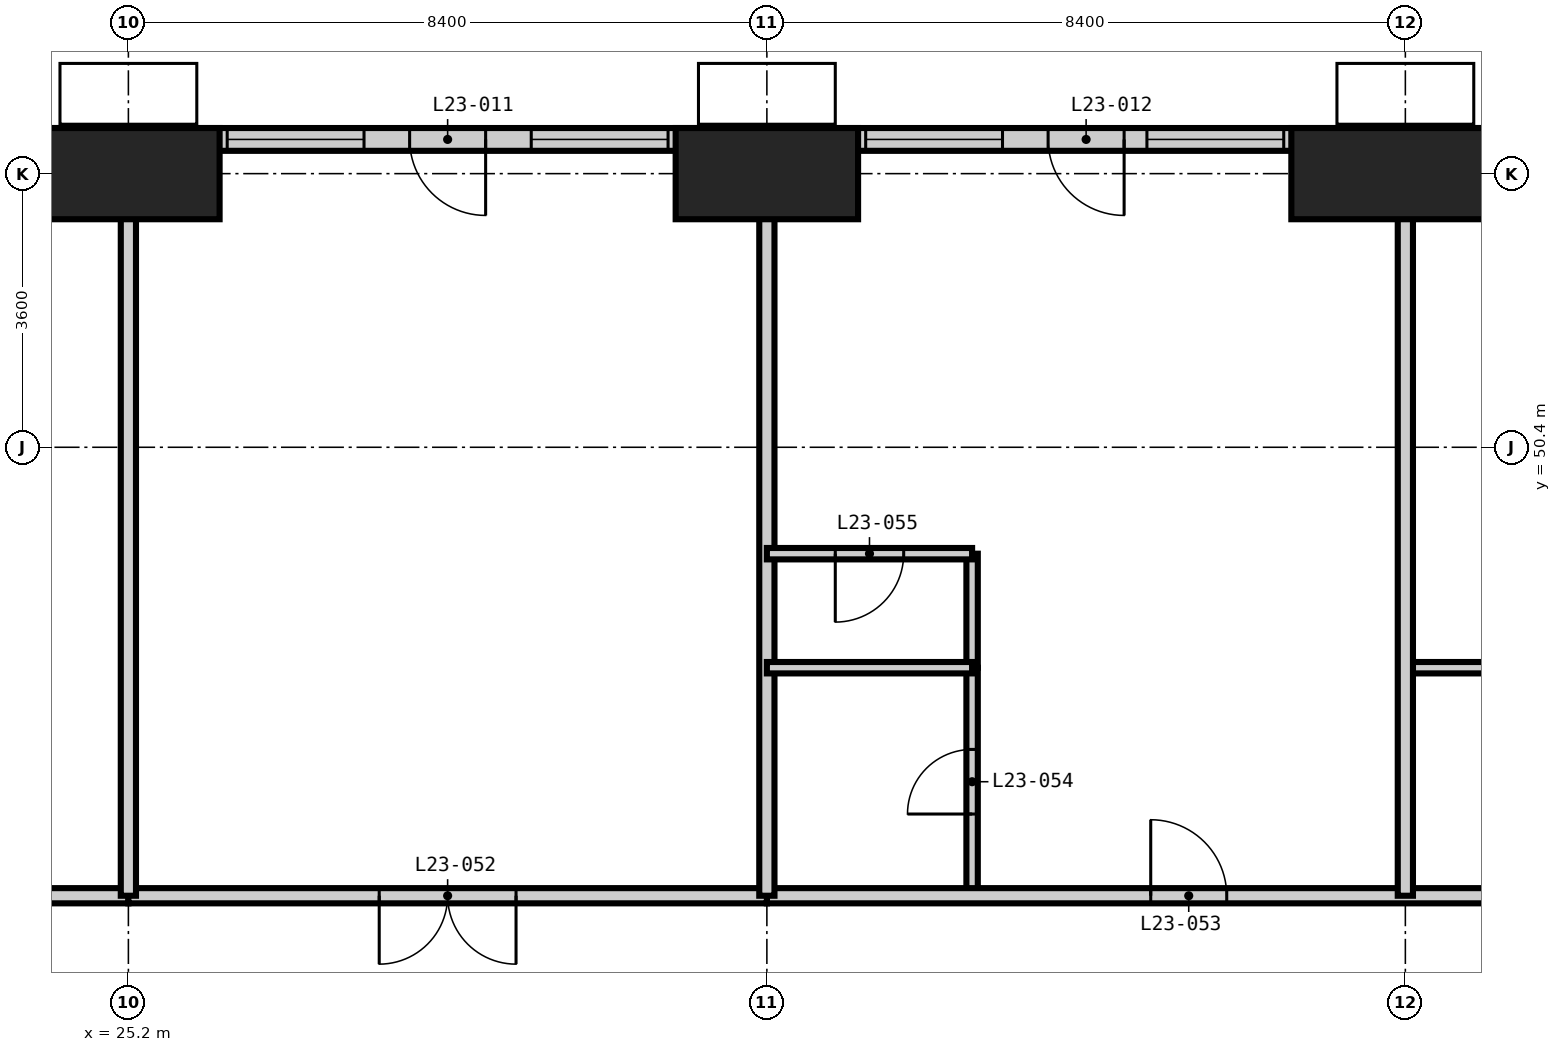
"""IFC4 building model, lengths in metres.
Left out: names, types, materials, properties, quantities, classifications, styles, units other than length and angle.
Written with IfcOpenShell. Run it as: python <this file> out.ifc"""

import sys

from ifc_helpers import new_model, si_unit, direction, frame, frame_2d, origin, origin_2d, place, context, subcontext, project, spatial, rectangle, extrude, element, fill, save


model = new_model("IFC4")
c1 = context("Model", 3, precision=1e-05, world=origin(), true_north=direction((0.0, 1.0)))
c2 = subcontext(c1, "Body", "Model", "MODEL_VIEW")
j1 = project(units=[si_unit("LENGTHUNIT", "METRE"), si_unit("PLANEANGLEUNIT", "RADIAN")], contexts=[c1])
p1 = place(None, origin())
s1 = spatial("IfcSite", under=j1, at=p1, CompositionType="ELEMENT")
p2 = place(p1, origin())
s2 = spatial("IfcBuilding", under=s1, at=p2, CompositionType="ELEMENT")
p3 = place(p2, frame((0.0, 0.0, 93.6)))
s3 = spatial("IfcBuildingStorey", under=s2, at=p3, CompositionType="ELEMENT", Elevation=93.6)
for number, where, z_axis, x_axis in (
    (1, (25.2, 54.0, -0.35), (0.0, 0.0, 1.0), (1.0, 0.0, 0.0)),
    (2, (33.6, 54.0, -0.35), (0.0, 0.0, 1.0), (1.0, 0.0, 0.0)),
):
    element("IfcColumn", number, at=place(p3, frame(where, z_axis=z_axis, x_axis=x_axis)), inside=s3, PredefinedType="COLUMN", context=c2, shape_type="SweptSolid", body=[
        extrude(rectangle(XDim=2.4, YDim=1.2, at=origin_2d()), origin(), (0.0, 0.0, 1.0), 3.6),
    ])
p4 = place(p3, frame((42.0, 54.0, -0.35), z_axis=(0.0, 0.0, 1.0), x_axis=(1.0, 0.0, 0.0)))
e3 = element("IfcColumn", 3, at=p4, inside=s3, PredefinedType="COLUMN", context=c2, shape_type="SweptSolid", body=[
    extrude(rectangle(XDim=3.0, YDim=1.2, at=origin_2d()), origin(), (0.0, 0.0, 1.0), 3.6),
])
p5 = place(p3, frame((51.9, 54.45, 0.0), z_axis=(0.0, 0.0, 1.0), x_axis=(-1.0, 0.0, 0.0)))
e4 = element("IfcWall", 4, at=p5, inside=s3, PredefinedType="SOLIDWALL", context=c2, shape_type="SweptSolid", body=[
    extrude(rectangle(XDim=49.2, YDim=0.3, at=frame_2d((24.6, 0.0))), origin(), (0.0, 0.0, 1.0), 3.25),
])
p6 = place(p5, frame((45.85, 0.0, 0.0)))
e5 = element("IfcOpeningElement", 5, at=p6, cuts=e4, PredefinedType="OPENING", context=c2, shape_type="SweptSolid", body=[
    extrude(rectangle(XDim=1.0, YDim=2.4, at=frame_2d((0.5, 1.2))), frame((0.0, 0.16, 0.0), z_axis=(0.0, -1.0, 0.0), x_axis=(1.0, 0.0, 0.0)), (0.0, 0.0, 1.0), 0.32),
])
p7 = place(p5, frame((47.1, 0.0, 0.6)))
e6 = element("IfcOpeningElement", 6, at=p7, cuts=e4, PredefinedType="OPENING", context=c2, shape_type="SweptSolid", body=[
    extrude(rectangle(XDim=1.8, YDim=2.1, at=frame_2d((0.9, 1.05))), frame((0.0, 0.16, 0.0), z_axis=(0.0, -1.0, 0.0), x_axis=(1.0, 0.0, 0.0)), (0.0, 0.0, 1.0), 0.32),
])
p8 = place(p5, frame((38.8, 0.0, 0.0)))
e7 = element("IfcOpeningElement", 7, at=p8, cuts=e4, PredefinedType="OPENING", context=c2, shape_type="SweptSolid", body=[
    extrude(rectangle(XDim=1.0, YDim=2.4, at=frame_2d((0.5, 1.2))), frame((0.0, 0.16, 0.0), z_axis=(0.0, -1.0, 0.0), x_axis=(1.0, 0.0, 0.0)), (0.0, 0.0, 1.0), 0.32),
])
p9 = place(p5, frame((40.4, 0.0, 0.6)))
e8 = element("IfcOpeningElement", 8, at=p9, cuts=e4, PredefinedType="OPENING", context=c2, shape_type="SweptSolid", body=[
    extrude(rectangle(XDim=1.8, YDim=2.1, at=frame_2d((0.9, 1.05))), frame((0.0, 0.16, 0.0), z_axis=(0.0, -1.0, 0.0), x_axis=(1.0, 0.0, 0.0)), (0.0, 0.0, 1.0), 0.32),
])
p10 = place(p5, frame((36.7, 0.0, 0.6)))
e9 = element("IfcOpeningElement", 9, at=p10, cuts=e4, PredefinedType="OPENING", context=c2, shape_type="SweptSolid", body=[
    extrude(rectangle(XDim=1.8, YDim=2.1, at=frame_2d((0.9, 1.05))), frame((0.0, 0.16, 0.0), z_axis=(0.0, -1.0, 0.0), x_axis=(1.0, 0.0, 0.0)), (0.0, 0.0, 1.0), 0.32),
])
p11 = place(p5, frame((30.4, 0.0, 0.0)))
e10 = element("IfcOpeningElement", 10, at=p11, cuts=e4, PredefinedType="OPENING", context=c2, shape_type="SweptSolid", body=[
    extrude(rectangle(XDim=1.0, YDim=2.4, at=frame_2d((0.5, 1.2))), frame((0.0, 0.16, 0.0), z_axis=(0.0, -1.0, 0.0), x_axis=(1.0, 0.0, 0.0)), (0.0, 0.0, 1.0), 0.32),
])
p12 = place(p5, frame((31.7, 0.0, 0.6)))
e11 = element("IfcOpeningElement", 11, at=p12, cuts=e4, PredefinedType="OPENING", context=c2, shape_type="SweptSolid", body=[
    extrude(rectangle(XDim=1.8, YDim=2.1, at=frame_2d((0.9, 1.05))), frame((0.0, 0.16, 0.0), z_axis=(0.0, -1.0, 0.0), x_axis=(1.0, 0.0, 0.0)), (0.0, 0.0, 1.0), 0.32),
])
p13 = place(p5, frame((28.0, 0.0, 0.6)))
e12 = element("IfcOpeningElement", 12, at=p13, cuts=e4, PredefinedType="OPENING", context=c2, shape_type="SweptSolid", body=[
    extrude(rectangle(XDim=1.8, YDim=2.1, at=frame_2d((0.9, 1.05))), frame((0.0, 0.16, 0.0), z_axis=(0.0, -1.0, 0.0), x_axis=(1.0, 0.0, 0.0)), (0.0, 0.0, 1.0), 0.32),
])
p14 = place(p5, frame((22.0, 0.0, 0.0)))
e13 = element("IfcOpeningElement", 13, at=p14, cuts=e4, PredefinedType="OPENING", context=c2, shape_type="SweptSolid", body=[
    extrude(rectangle(XDim=1.0, YDim=2.4, at=frame_2d((0.5, 1.2))), frame((0.0, 0.16, 0.0), z_axis=(0.0, -1.0, 0.0), x_axis=(1.0, 0.0, 0.0)), (0.0, 0.0, 1.0), 0.32),
])
p15 = place(p5, frame((23.6, 0.0, 0.6)))
e14 = element("IfcOpeningElement", 14, at=p15, cuts=e4, PredefinedType="OPENING", context=c2, shape_type="SweptSolid", body=[
    extrude(rectangle(XDim=1.8, YDim=2.1, at=frame_2d((0.9, 1.05))), frame((0.0, 0.16, 0.0), z_axis=(0.0, -1.0, 0.0), x_axis=(1.0, 0.0, 0.0)), (0.0, 0.0, 1.0), 0.32),
])
p16 = place(p5, frame((19.6, 0.0, 0.6)))
e15 = element("IfcOpeningElement", 15, at=p16, cuts=e4, PredefinedType="OPENING", context=c2, shape_type="SweptSolid", body=[
    extrude(rectangle(XDim=1.8, YDim=2.1, at=frame_2d((0.9, 1.05))), frame((0.0, 0.16, 0.0), z_axis=(0.0, -1.0, 0.0), x_axis=(1.0, 0.0, 0.0)), (0.0, 0.0, 1.0), 0.32),
])
p17 = place(p5, frame((13.6, 0.0, 0.0)))
e16 = element("IfcOpeningElement", 16, at=p17, cuts=e4, PredefinedType="OPENING", context=c2, shape_type="SweptSolid", body=[
    extrude(rectangle(XDim=1.0, YDim=2.4, at=frame_2d((0.5, 1.2))), frame((0.0, 0.16, 0.0), z_axis=(0.0, -1.0, 0.0), x_axis=(1.0, 0.0, 0.0)), (0.0, 0.0, 1.0), 0.32),
])
p18 = place(p5, frame((15.2, 0.0, 0.6)))
e17 = element("IfcOpeningElement", 17, at=p18, cuts=e4, PredefinedType="OPENING", context=c2, shape_type="SweptSolid", body=[
    extrude(rectangle(XDim=1.8, YDim=2.1, at=frame_2d((0.9, 1.05))), frame((0.0, 0.16, 0.0), z_axis=(0.0, -1.0, 0.0), x_axis=(1.0, 0.0, 0.0)), (0.0, 0.0, 1.0), 0.32),
])
p19 = place(p5, frame((11.5, 0.0, 0.6)))
e18 = element("IfcOpeningElement", 18, at=p19, cuts=e4, PredefinedType="OPENING", context=c2, shape_type="SweptSolid", body=[
    extrude(rectangle(XDim=1.8, YDim=2.1, at=frame_2d((0.9, 1.05))), frame((0.0, 0.16, 0.0), z_axis=(0.0, -1.0, 0.0), x_axis=(1.0, 0.0, 0.0)), (0.0, 0.0, 1.0), 0.32),
])
p20 = place(p5, frame((7.3, 0.0, 0.0)))
e19 = element("IfcOpeningElement", 19, at=p20, cuts=e4, PredefinedType="OPENING", context=c2, shape_type="SweptSolid", body=[
    extrude(rectangle(XDim=1.0, YDim=2.4, at=frame_2d((0.5, 1.2))), frame((0.0, 0.16, 0.0), z_axis=(0.0, -1.0, 0.0), x_axis=(1.0, 0.0, 0.0)), (0.0, 0.0, 1.0), 0.32),
])
p21 = place(p5, frame((2.75, 0.0, 0.0)))
e20 = element("IfcOpeningElement", 20, at=p21, cuts=e4, PredefinedType="OPENING", context=c2, shape_type="SweptSolid", body=[
    extrude(rectangle(XDim=1.0, YDim=2.4, at=frame_2d((0.5, 1.2))), frame((0.0, 0.16, 0.0), z_axis=(0.0, -1.0, 0.0), x_axis=(1.0, 0.0, 0.0)), (0.0, 0.0, 1.0), 0.32),
])
p22 = place(p3, frame((36.3, 44.5, 0.0), z_axis=(0.0, 0.0, 1.0), x_axis=(0.0, 1.0, 0.0)))
e21 = element("IfcWall", 21, at=p22, inside=s3, PredefinedType="PARTITIONING", context=c2, shape_type="SweptSolid", body=[
    extrude(rectangle(XDim=3.0, YDim=0.15, at=frame_2d((1.5, 0.0))), origin(), (0.0, 0.0, 1.0), 3.25),
])
p23 = place(p22, frame((1.075, 0.0, 0.0)))
e22 = element("IfcOpeningElement", 22, at=p23, cuts=e21, PredefinedType="OPENING", context=c2, shape_type="SweptSolid", body=[
    extrude(rectangle(XDim=0.85, YDim=2.1, at=frame_2d((0.425, 1.05))), frame((0.0, 0.085, 0.0), z_axis=(0.0, -1.0, 0.0), x_axis=(1.0, 0.0, 0.0)), (0.0, 0.0, 1.0), 0.17),
])
p24 = place(p3, frame((42.0, 47.5, 0.0), z_axis=(0.0, 0.0, 1.0), x_axis=(1.0, 0.0, 0.0)))
e23 = element("IfcWall", 23, at=p24, inside=s3, PredefinedType="PARTITIONING", context=c2, shape_type="SweptSolid", body=[
    extrude(rectangle(XDim=3.1, YDim=0.15, at=frame_2d((1.55, 0.0))), origin(), (0.0, 0.0, 1.0), 3.25),
])
p25 = place(p24, frame((1.125, 0.0, 0.0)))
e24 = element("IfcOpeningElement", 24, at=p25, cuts=e23, PredefinedType="OPENING", context=c2, shape_type="SweptSolid", body=[
    extrude(rectangle(XDim=0.85, YDim=2.1, at=frame_2d((0.425, 1.05))), frame((0.0, 0.085, 0.0), z_axis=(0.0, -1.0, 0.0), x_axis=(1.0, 0.0, 0.0)), (0.0, 0.0, 1.0), 0.17),
])
p26 = place(p3, frame((12.6, 44.5, 0.0), z_axis=(0.0, 0.0, 1.0), x_axis=(1.0, 0.0, 0.0)))
e25 = element("IfcWall", 25, at=p26, inside=s3, PredefinedType="PARTITIONING", context=c2, shape_type="SweptSolid", body=[
    extrude(rectangle(XDim=12.6, YDim=0.2, at=frame_2d((6.3, 0.0))), origin(), (0.0, 0.0, 1.0), 3.25),
])
p27 = place(p26, frame((9.25, 0.0, 0.0)))
e26 = element("IfcOpeningElement", 26, at=p27, cuts=e25, PredefinedType="OPENING", context=c2, shape_type="SweptSolid", body=[
    extrude(rectangle(XDim=1.0, YDim=2.2, at=frame_2d((0.5, 1.1))), frame((0.0, 0.11, 0.0), z_axis=(0.0, -1.0, 0.0), x_axis=(1.0, 0.0, 0.0)), (0.0, 0.0, 1.0), 0.22),
])
p28 = place(p3, frame((33.6, 44.5, 0.0), z_axis=(0.0, 0.0, 1.0), x_axis=(1.0, 0.0, 0.0)))
e27 = element("IfcWall", 27, at=p28, inside=s3, PredefinedType="PARTITIONING", context=c2, shape_type="SweptSolid", body=[
    extrude(rectangle(XDim=11.5, YDim=0.2, at=frame_2d((5.75, 0.0))), origin(), (0.0, 0.0, 1.0), 3.25),
])
p29 = place(p28, frame((5.05, 0.0, 0.0)))
e28 = element("IfcOpeningElement", 28, at=p29, cuts=e27, PredefinedType="OPENING", context=c2, shape_type="SweptSolid", body=[
    extrude(rectangle(XDim=1.0, YDim=2.2, at=frame_2d((0.5, 1.1))), frame((0.0, 0.11, 0.0), z_axis=(0.0, -1.0, 0.0), x_axis=(1.0, 0.0, 0.0)), (0.0, 0.0, 1.0), 0.22),
])
p30 = place(p3, frame((33.6, 44.5, 0.0), z_axis=(0.0, 0.0, 1.0), x_axis=(-1.0, 0.0, 0.0)))
e29 = element("IfcWall", 29, at=p30, inside=s3, PredefinedType="PARTITIONING", context=c2, shape_type="SweptSolid", body=[
    extrude(rectangle(XDim=8.4, YDim=0.2, at=frame_2d((4.2, 0.0))), origin(), (0.0, 0.0, 1.0), 3.25),
])
p31 = place(p30, frame((3.3, 0.0, 0.0)))
e30 = element("IfcOpeningElement", 30, at=p31, cuts=e29, PredefinedType="OPENING", context=c2, shape_type="SweptSolid", body=[
    extrude(rectangle(XDim=1.8, YDim=2.4, at=frame_2d((0.9, 1.2))), frame((0.0, 0.11, 0.0), z_axis=(0.0, -1.0, 0.0), x_axis=(1.0, 0.0, 0.0)), (0.0, 0.0, 1.0), 0.22),
])
for number, where, z_axis, x_axis in (
    (31, (25.2, 44.5, 0.0), (0.0, 0.0, 1.0), (0.0, 1.0, 0.0)),
    (32, (33.6, 44.5, 0.0), (0.0, 0.0, 1.0), (0.0, 1.0, 0.0)),
    (33, (42.0, 44.5, 0.0), (0.0, 0.0, 1.0), (0.0, 1.0, 0.0)),
):
    element("IfcWall", number, at=place(p3, frame(where, z_axis=z_axis, x_axis=x_axis)), inside=s3, PredefinedType="PARTITIONING", context=c2, shape_type="SweptSolid", body=[
        extrude(rectangle(XDim=10.1, YDim=0.2, at=frame_2d((5.05, 0.0))), origin(), (0.0, 0.0, 1.0), 3.25),
    ])
p32 = place(p3, frame((36.3, 47.5, 0.0), z_axis=(0.0, 0.0, 1.0), x_axis=(0.0, 1.0, 0.0)))
e34 = element("IfcWall", 34, at=p32, inside=s3, PredefinedType="PARTITIONING", context=c2, shape_type="SweptSolid", body=[
    extrude(rectangle(XDim=1.5, YDim=0.15, at=frame_2d((0.75, 0.0))), origin(), (0.0, 0.0, 1.0), 3.25),
])
p33 = place(p3, frame((33.6, 47.5, 0.0), z_axis=(0.0, 0.0, 1.0), x_axis=(1.0, 0.0, 0.0)))
e35 = element("IfcWall", 35, at=p33, inside=s3, PredefinedType="PARTITIONING", context=c2, shape_type="SweptSolid", body=[
    extrude(rectangle(XDim=2.7, YDim=0.15, at=frame_2d((1.35, 0.0))), origin(), (0.0, 0.0, 1.0), 3.25),
])
p34 = place(p3, frame((33.6, 49.0, 0.0), z_axis=(0.0, 0.0, 1.0), x_axis=(1.0, 0.0, 0.0)))
e36 = element("IfcWall", 36, at=p34, inside=s3, PredefinedType="PARTITIONING", context=c2, shape_type="SweptSolid", body=[
    extrude(rectangle(XDim=2.7, YDim=0.15, at=frame_2d((1.35, 0.0))), origin(), (0.0, 0.0, 1.0), 3.25),
])
p35 = place(p34, frame((0.9, 0.0, 0.0)))
e37 = element("IfcOpeningElement", 37, at=p35, cuts=e36, PredefinedType="OPENING", context=c2, shape_type="SweptSolid", body=[
    extrude(rectangle(XDim=0.9, YDim=2.1, at=frame_2d((0.45, 1.05))), frame((0.0, 0.085, 0.0), z_axis=(0.0, -1.0, 0.0), x_axis=(1.0, 0.0, 0.0)), (0.0, 0.0, 1.0), 0.17),
])
p36 = place(p14, origin())
e38 = element("IfcDoor", 38, at=p36, inside=s3, OperationType="SINGLE_SWING_LEFT", PredefinedType="DOOR", context=c2, shape_type="SweptSolid", body=[
    extrude(rectangle(XDim=1.0, YDim=2.4, at=frame_2d((0.5, 1.2))), frame((0.0, 0.025, 0.0), z_axis=(0.0, -1.0, 0.0), x_axis=(1.0, 0.0, 0.0)), (0.0, 0.0, 1.0), 0.05),
])
fill(e13, e38)
p37 = place(p15, origin())
e39 = element("IfcWindow", 39, at=p37, inside=s3, PartitioningType="SINGLE_PANEL", PredefinedType="WINDOW", context=c2, shape_type="SweptSolid", body=[
    extrude(rectangle(XDim=1.8, YDim=2.1, at=frame_2d((0.9, 1.05))), frame((0.0, 0.03, 0.0), z_axis=(0.0, -1.0, 0.0), x_axis=(1.0, 0.0, 0.0)), (0.0, 0.0, 1.0), 0.06),
])
fill(e14, e39)
p38 = place(p16, origin())
e40 = element("IfcWindow", 40, at=p38, inside=s3, PartitioningType="SINGLE_PANEL", PredefinedType="WINDOW", context=c2, shape_type="SweptSolid", body=[
    extrude(rectangle(XDim=1.8, YDim=2.1, at=frame_2d((0.9, 1.05))), frame((0.0, 0.03, 0.0), z_axis=(0.0, -1.0, 0.0), x_axis=(1.0, 0.0, 0.0)), (0.0, 0.0, 1.0), 0.06),
])
fill(e15, e40)
p39 = place(p17, origin())
e41 = element("IfcDoor", 41, at=p39, inside=s3, OperationType="SINGLE_SWING_LEFT", PredefinedType="DOOR", context=c2, shape_type="SweptSolid", body=[
    extrude(rectangle(XDim=1.0, YDim=2.4, at=frame_2d((0.5, 1.2))), frame((0.0, 0.025, 0.0), z_axis=(0.0, -1.0, 0.0), x_axis=(1.0, 0.0, 0.0)), (0.0, 0.0, 1.0), 0.05),
])
fill(e16, e41)
p40 = place(p18, origin())
e42 = element("IfcWindow", 42, at=p40, inside=s3, PartitioningType="SINGLE_PANEL", PredefinedType="WINDOW", context=c2, shape_type="SweptSolid", body=[
    extrude(rectangle(XDim=1.8, YDim=2.1, at=frame_2d((0.9, 1.05))), frame((0.0, 0.03, 0.0), z_axis=(0.0, -1.0, 0.0), x_axis=(1.0, 0.0, 0.0)), (0.0, 0.0, 1.0), 0.06),
])
fill(e17, e42)
p41 = place(p19, origin())
e43 = element("IfcWindow", 43, at=p41, inside=s3, PartitioningType="SINGLE_PANEL", PredefinedType="WINDOW", context=c2, shape_type="SweptSolid", body=[
    extrude(rectangle(XDim=1.8, YDim=2.1, at=frame_2d((0.9, 1.05))), frame((0.0, 0.03, 0.0), z_axis=(0.0, -1.0, 0.0), x_axis=(1.0, 0.0, 0.0)), (0.0, 0.0, 1.0), 0.06),
])
fill(e18, e43)
p42 = place(p31, origin())
e44 = element("IfcDoor", 44, at=p42, inside=s3, OperationType="DOUBLE_DOOR_DOUBLE_SWING", PredefinedType="DOOR", context=c2, shape_type="SweptSolid", body=[
    extrude(rectangle(XDim=1.8, YDim=2.4, at=frame_2d((0.9, 1.2))), frame((0.0, 0.025, 0.0), z_axis=(0.0, -1.0, 0.0), x_axis=(1.0, 0.0, 0.0)), (0.0, 0.0, 1.0), 0.05),
])
fill(e30, e44)
p43 = place(p29, origin())
e45 = element("IfcDoor", 45, at=p43, inside=s3, OperationType="SINGLE_SWING_LEFT", PredefinedType="DOOR", context=c2, shape_type="SweptSolid", body=[
    extrude(rectangle(XDim=1.0, YDim=2.2, at=frame_2d((0.5, 1.1))), frame((0.0, 0.025, 0.0), z_axis=(0.0, -1.0, 0.0), x_axis=(1.0, 0.0, 0.0)), (0.0, 0.0, 1.0), 0.05),
])
fill(e28, e45)
p44 = place(p23, origin())
e46 = element("IfcDoor", 46, at=p44, inside=s3, OperationType="SINGLE_SWING_LEFT", PredefinedType="DOOR", context=c2, shape_type="SweptSolid", body=[
    extrude(rectangle(XDim=0.85, YDim=2.1, at=frame_2d((0.425, 1.05))), frame((0.0, 0.025, 0.0), z_axis=(0.0, -1.0, 0.0), x_axis=(1.0, 0.0, 0.0)), (0.0, 0.0, 1.0), 0.05),
])
fill(e22, e46)
p45 = place(p35, frame((0.9, 0.0, 0.0), z_axis=(0.0, 0.0, 1.0), x_axis=(-1.0, 0.0, 0.0)))
e47 = element("IfcDoor", 47, at=p45, inside=s3, OperationType="SINGLE_SWING_RIGHT", PredefinedType="DOOR", context=c2, shape_type="SweptSolid", body=[
    extrude(rectangle(XDim=0.9, YDim=2.1, at=frame_2d((0.45, 1.05))), frame((0.0, 0.025, 0.0), z_axis=(0.0, -1.0, 0.0), x_axis=(1.0, 0.0, 0.0)), (0.0, 0.0, 1.0), 0.05),
])
fill(e37, e47)
save(model, sys.argv[1])
